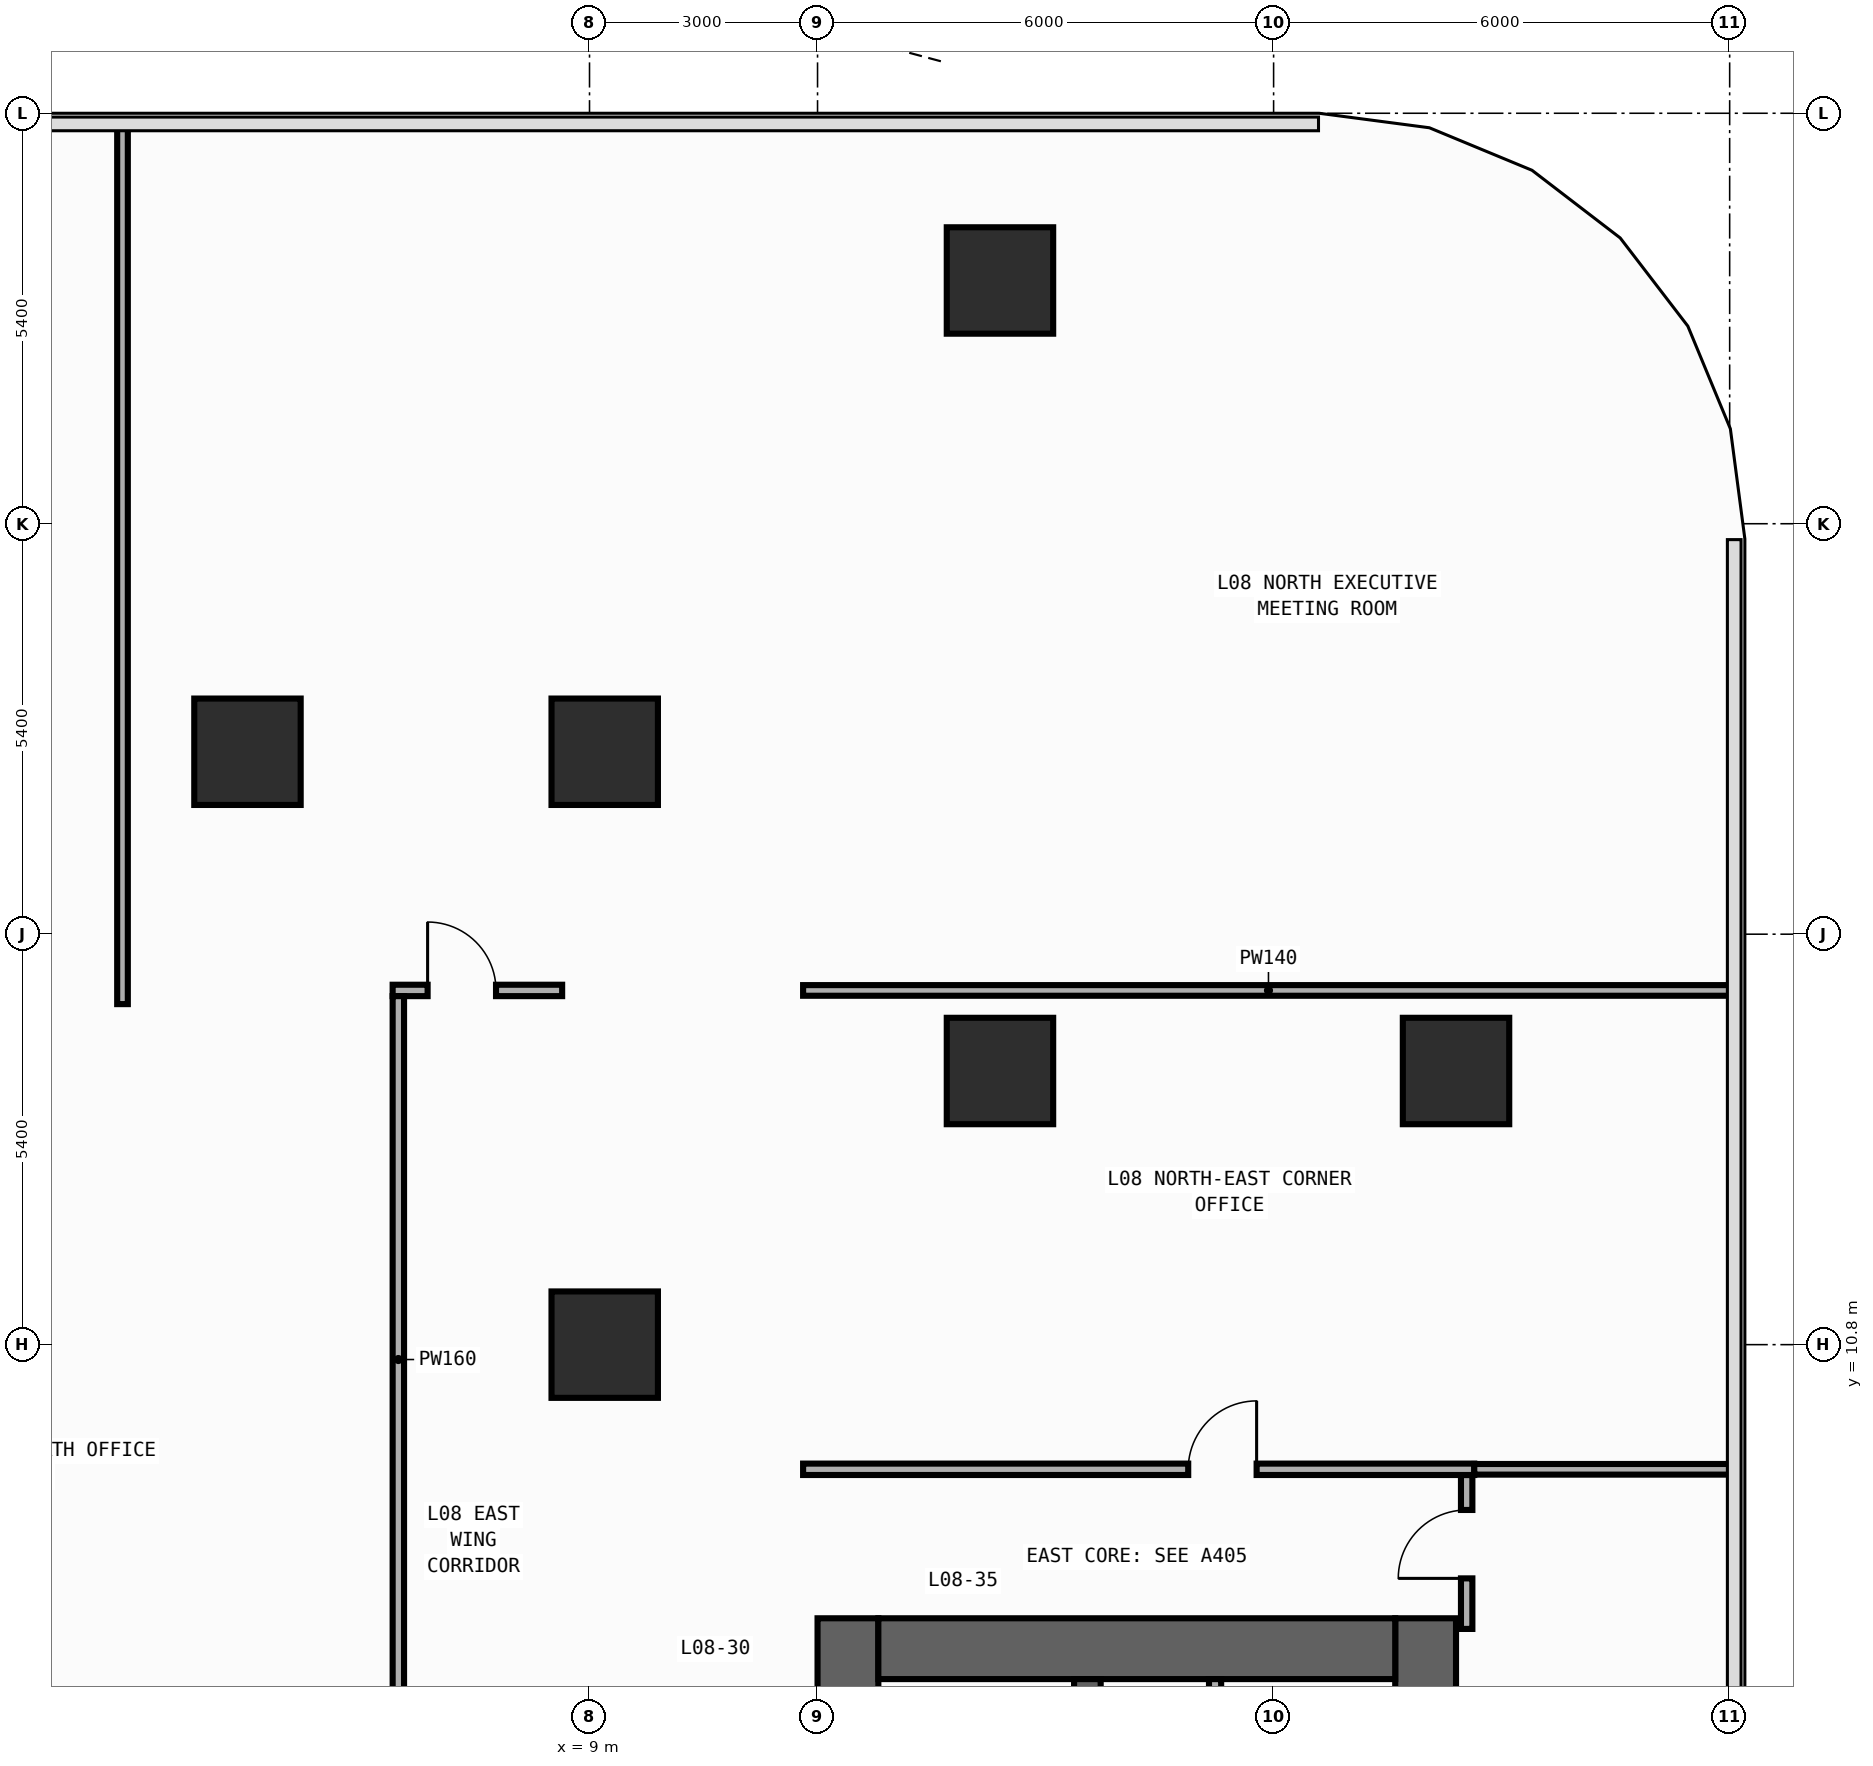
"""IFC4 building model, lengths in metres.
Left out: names, types, materials, properties, quantities, classifications, styles, units other than length and angle.
Written with IfcOpenShell. Run it as: python <this file> out.ifc"""

import sys

from ifc_helpers import new_model, si_unit, direction, frame, frame_2d, origin, origin_2d, place, context, subcontext, project, spatial, rectangle, extrude, element, fill, save


model = new_model("IFC4")
c1 = context("Model", 3, precision=1e-05, world=origin(), true_north=direction((0.0, 1.0)))
c2 = subcontext(c1, "Body", "Model", "MODEL_VIEW")
j1 = project(units=[si_unit("LENGTHUNIT", "METRE"), si_unit("PLANEANGLEUNIT", "RADIAN")], contexts=[c1])
p1 = place(None, origin())
s1 = spatial("IfcSite", under=j1, at=p1, CompositionType="ELEMENT")
p2 = place(p1, origin())
s2 = spatial("IfcBuilding", under=s1, at=p2, CompositionType="ELEMENT")
p3 = place(p2, frame((0.0, 0.0, 34.4)))
s3 = spatial("IfcBuildingStorey", under=s2, at=p3, CompositionType="ELEMENT", Elevation=34.4)
p4 = place(p3, frame((12.4, -19.8, 0.0), z_axis=(0.0, 0.0, 1.0), x_axis=(0.0, 1.0, 0.0)))
e1 = element("IfcWall", 1, at=p4, inside=s3, PredefinedType="SHEAR", context=c2, shape_type="SweptSolid", body=[
    extrude(rectangle(XDim=27.0, YDim=0.8, at=frame_2d((13.5, 0.0))), origin(), (0.0, 0.0, 1.0), 3.94),
])
p5 = place(p4, frame((23.05, 0.0, 0.0)))
e2 = element("IfcOpeningElement", 2, at=p5, cuts=e1, PredefinedType="OPENING", context=c2, shape_type="SweptSolid", body=[
    extrude(rectangle(XDim=1.1, YDim=2.2, at=frame_2d((0.55, 1.1))), frame((0.0, 0.41, 0.0), z_axis=(0.0, -1.0, 0.0), x_axis=(1.0, 0.0, 0.0)), (0.0, 0.0, 1.0), 0.82),
])
p6 = place(p4, frame((19.85, 0.0, 0.0)))
e3 = element("IfcOpeningElement", 3, at=p6, cuts=e1, PredefinedType="OPENING", context=c2, shape_type="SweptSolid", body=[
    extrude(rectangle(XDim=1.1, YDim=2.2, at=frame_2d((0.55, 1.1))), frame((0.0, 0.41, 0.0), z_axis=(0.0, -1.0, 0.0), x_axis=(1.0, 0.0, 0.0)), (0.0, 0.0, 1.0), 0.82),
])
p7 = place(p4, frame((16.65, 0.0, 0.0)))
e4 = element("IfcOpeningElement", 4, at=p7, cuts=e1, PredefinedType="OPENING", context=c2, shape_type="SweptSolid", body=[
    extrude(rectangle(XDim=1.1, YDim=2.2, at=frame_2d((0.55, 1.1))), frame((0.0, 0.41, 0.0), z_axis=(0.0, -1.0, 0.0), x_axis=(1.0, 0.0, 0.0)), (0.0, 0.0, 1.0), 0.82),
])
p8 = place(p4, frame((7.175, 0.0, 0.0)))
e5 = element("IfcOpeningElement", 5, at=p8, cuts=e1, PredefinedType="OPENING", context=c2, shape_type="SweptSolid", body=[
    extrude(rectangle(XDim=0.85, YDim=2.1, at=frame_2d((0.425, 1.05))), frame((0.0, 0.41, 0.0), z_axis=(0.0, -1.0, 0.0), x_axis=(1.0, 0.0, 0.0)), (0.0, 0.0, 1.0), 0.82),
])
p9 = place(p4, frame((10.375, 0.0, 0.0)))
e6 = element("IfcOpeningElement", 6, at=p9, cuts=e1, PredefinedType="OPENING", context=c2, shape_type="SweptSolid", body=[
    extrude(rectangle(XDim=0.85, YDim=2.1, at=frame_2d((0.425, 1.05))), frame((0.0, 0.41, 0.0), z_axis=(0.0, -1.0, 0.0), x_axis=(1.0, 0.0, 0.0)), (0.0, 0.0, 1.0), 0.82),
])
p10 = place(p4, frame((12.725, 0.0, 0.0)))
e7 = element("IfcOpeningElement", 7, at=p10, cuts=e1, PredefinedType="OPENING", context=c2, shape_type="SweptSolid", body=[
    extrude(rectangle(XDim=1.15, YDim=2.2, at=frame_2d((0.575, 1.1))), frame((0.0, 0.41, 0.0), z_axis=(0.0, -1.0, 0.0), x_axis=(1.0, 0.0, 0.0)), (0.0, 0.0, 1.0), 0.82),
])
p11 = place(p4, frame((25.125, 0.0, 0.0)))
e8 = element("IfcOpeningElement", 8, at=p11, cuts=e1, PredefinedType="OPENING", context=c2, shape_type="SweptSolid", body=[
    extrude(rectangle(XDim=0.85, YDim=2.1, at=frame_2d((0.425, 1.05))), frame((0.0, 0.41, 0.0), z_axis=(0.0, -1.0, 0.0), x_axis=(1.0, 0.0, 0.0)), (0.0, 0.0, 1.0), 0.82),
])
p12 = place(p3, frame((20.0, -19.8, 0.0), z_axis=(0.0, 0.0, 1.0), x_axis=(0.0, 1.0, 0.0)))
e9 = element("IfcWall", 9, at=p12, inside=s3, PredefinedType="SHEAR", context=c2, shape_type="SweptSolid", body=[
    extrude(rectangle(XDim=27.0, YDim=0.8, at=frame_2d((13.5, 0.0))), origin(), (0.0, 0.0, 1.0), 3.94),
])
p13 = place(p3, frame((12.8, 6.8, 0.0), z_axis=(0.0, 0.0, 1.0), x_axis=(1.0, 0.0, 0.0)))
e10 = element("IfcWall", 10, at=p13, inside=s3, PredefinedType="SHEAR", context=c2, shape_type="SweptSolid", body=[
    extrude(rectangle(XDim=6.8, YDim=0.8, at=frame_2d((3.4, 0.0))), origin(), (0.0, 0.0, 1.0), 3.94),
])
p14 = place(p3, frame((15.55, -19.0, 0.0), z_axis=(0.0, 0.0, 1.0), x_axis=(0.0, 1.0, 0.0)))
e11 = element("IfcWall", 11, at=p14, inside=s3, PredefinedType="SHEAR", context=c2, shape_type="SweptSolid", body=[
    extrude(rectangle(XDim=25.4, YDim=0.35, at=frame_2d((12.7, 0.0))), origin(), (0.0, 0.0, 1.0), 3.94),
])
p15 = place(p14, frame((11.925, 0.0, 0.0)))
e12 = element("IfcOpeningElement", 12, at=p15, cuts=e11, PredefinedType="OPENING", context=c2, shape_type="SweptSolid", body=[
    extrude(rectangle(XDim=1.15, YDim=2.2, at=frame_2d((0.575, 1.1))), frame((0.0, 0.185, 0.0), z_axis=(0.0, -1.0, 0.0), x_axis=(1.0, 0.0, 0.0)), (0.0, 0.0, 1.0), 0.37),
])
p16 = place(p14, frame((24.325, 0.0, 0.0)))
e13 = element("IfcOpeningElement", 13, at=p16, cuts=e11, PredefinedType="OPENING", context=c2, shape_type="SweptSolid", body=[
    extrude(rectangle(XDim=0.85, YDim=2.1, at=frame_2d((0.425, 1.05))), frame((0.0, 0.185, 0.0), z_axis=(0.0, -1.0, 0.0), x_axis=(1.0, 0.0, 0.0)), (0.0, 0.0, 1.0), 0.37),
])
for number, where, z_axis, x_axis in (
    (14, (9.2, 10.8, 0.0), (0.0, 0.0, 1.0), (1.0, 0.0, 0.0)),
    (15, (9.2, 18.6, 0.0), (0.0, 0.0, 1.0), (1.0, 0.0, 0.0)),
    (16, (20.4, 14.4, 0.0), (0.0, 0.0, 1.0), (1.0, 0.0, 0.0)),
    (17, (14.4, 14.4, 0.0), (0.0, 0.0, 1.0), (1.0, 0.0, 0.0)),
    (18, (4.5, 18.6, 0.0), (0.0, 0.0, 1.0), (1.0, 0.0, 0.0)),
    (19, (14.4, 24.8, 0.0), (0.0, 0.0, 1.0), (1.0, 0.0, 0.0)),
):
    element("IfcColumn", number, at=place(p3, frame(where, z_axis=z_axis, x_axis=x_axis)), inside=s3, PredefinedType="COLUMN", context=c2, shape_type="SweptSolid", body=[
        extrude(rectangle(XDim=1.4, YDim=1.4, at=origin_2d()), origin(), (0.0, 0.0, 1.0), 4.2),
    ])
p17 = place(p3, frame((17.23, 4.17, 0.0), z_axis=(0.0, 0.0, 1.0), x_axis=(0.0, 1.0, 0.0)))
e20 = element("IfcWall", 20, at=p17, inside=s3, PredefinedType="PARTITIONING", context=c2, shape_type="SweptSolid", body=[
    extrude(rectangle(XDim=2.23, YDim=0.16, at=frame_2d((1.115, 0.0))), origin(), (0.0, 0.0, 1.0), 3.94),
])
p18 = place(p17, frame((0.46, 0.0, 0.0)))
e21 = element("IfcOpeningElement", 21, at=p18, cuts=e20, PredefinedType="OPENING", context=c2, shape_type="SweptSolid", body=[
    extrude(rectangle(XDim=0.85, YDim=2.1, at=frame_2d((0.425, 1.05))), frame((0.0, 0.09, 0.0), z_axis=(0.0, -1.0, 0.0), x_axis=(1.0, 0.0, 0.0)), (0.0, 0.0, 1.0), 0.18),
])
p19 = place(p3, frame((6.41, 15.46, 0.0), z_axis=(0.0, 0.0, 1.0), x_axis=(1.0, 0.0, 0.0)))
e22 = element("IfcWall", 22, at=p19, inside=s3, PredefinedType="PARTITIONING", context=c2, shape_type="SweptSolid", body=[
    extrude(rectangle(XDim=2.23, YDim=0.15, at=frame_2d((1.115, 0.0))), origin(), (0.0, 0.0, 1.0), 3.94),
])
p20 = place(p19, frame((0.46, 0.0, 0.0)))
e23 = element("IfcOpeningElement", 23, at=p20, cuts=e22, PredefinedType="OPENING", context=c2, shape_type="SweptSolid", body=[
    extrude(rectangle(XDim=0.9, YDim=2.15, at=frame_2d((0.45, 1.075))), frame((0.0, 0.085, 0.0), z_axis=(0.0, -1.0, 0.0), x_axis=(1.0, 0.0, 0.0)), (0.0, 0.0, 1.0), 0.17),
])
p21 = place(p3, frame((6.485, -3.02, 0.0), z_axis=(0.0, 0.0, 1.0), x_axis=(0.0, 1.0, 0.0)))
e24 = element("IfcWall", 24, at=p21, inside=s3, PredefinedType="PARTITIONING", context=c2, shape_type="SweptSolid", body=[
    extrude(rectangle(XDim=18.405, YDim=0.15, at=frame_2d((9.203, 0.0))), origin(), (0.0, 0.0, 1.0), 3.94),
])
p22 = place(p21, frame((7.944, 0.0, 0.0)))
e25 = element("IfcOpeningElement", 25, at=p22, cuts=e24, PredefinedType="OPENING", context=c2, shape_type="SweptSolid", body=[
    extrude(rectangle(XDim=0.9, YDim=2.15, at=frame_2d((0.45, 1.075))), frame((0.0, 0.085, 0.0), z_axis=(0.0, -1.0, 0.0), x_axis=(1.0, 0.0, 0.0)), (0.0, 0.0, 1.0), 0.17),
])
p23 = place(p3, frame((20.54, 7.06, 0.0), z_axis=(0.0, 0.0, 1.0), x_axis=(0.0, 1.0, 0.0)))
e26 = element("IfcWall", 26, at=p23, inside=s3, PredefinedType="PARTITIONING", context=c2, shape_type="SweptSolid", body=[
    extrude(rectangle(XDim=2.025, YDim=0.15, at=frame_2d((1.012, 0.0))), origin(), (0.0, 0.0, 1.0), 3.94),
])
p24 = place(p23, frame((0.665, 0.0, 0.0)))
e27 = element("IfcOpeningElement", 27, at=p24, cuts=e26, PredefinedType="OPENING", context=c2, shape_type="SweptSolid", body=[
    extrude(rectangle(XDim=0.9, YDim=2.15, at=frame_2d((0.45, 1.075))), frame((0.0, 0.085, 0.0), z_axis=(0.0, -1.0, 0.0), x_axis=(1.0, 0.0, 0.0)), (0.0, 0.0, 1.0), 0.17),
])
p25 = place(p3, frame((11.81, 9.16, 0.0), z_axis=(0.0, 0.0, 1.0), x_axis=(1.0, 0.0, 0.0)))
e28 = element("IfcWall", 28, at=p25, inside=s3, PredefinedType="PARTITIONING", context=c2, shape_type="SweptSolid", body=[
    extrude(rectangle(XDim=8.83, YDim=0.15, at=frame_2d((4.415, 0.0))), origin(), (0.0, 0.0, 1.0), 3.94),
])
p26 = place(p25, frame((5.067, 0.0, 0.0)))
e29 = element("IfcOpeningElement", 29, at=p26, cuts=e28, PredefinedType="OPENING", context=c2, shape_type="SweptSolid", body=[
    extrude(rectangle(XDim=0.9, YDim=2.15, at=frame_2d((0.45, 1.075))), frame((0.0, 0.085, 0.0), z_axis=(0.0, -1.0, 0.0), x_axis=(1.0, 0.0, 0.0)), (0.0, 0.0, 1.0), 0.17),
])
p27 = place(p3, frame((20.64, 9.16, 0.0), z_axis=(0.0, 0.0, 1.0), x_axis=(1.0, 0.0, 0.0)))
e30 = element("IfcWall", 30, at=p27, inside=s3, PredefinedType="PARTITIONING", context=c2, shape_type="SweptSolid", body=[
    extrude(rectangle(XDim=3.415, YDim=0.14, at=frame_2d((1.708, 0.0))), origin(), (0.0, 0.0, 1.0), 3.94),
])
p28 = place(p3, frame((11.81, 15.46, 0.0), z_axis=(0.0, 0.0, 1.0), x_axis=(1.0, 0.0, 0.0)))
e31 = element("IfcWall", 31, at=p28, inside=s3, PredefinedType="PARTITIONING", context=c2, shape_type="SweptSolid", body=[
    extrude(rectangle(XDim=12.245, YDim=0.14, at=frame_2d((6.123, 0.0))), origin(), (0.0, 0.0, 1.0), 3.94),
])
p29 = place(p3, frame((2.856, 15.28, 0.0), z_axis=(0.0, 0.0, 1.0), x_axis=(0.0, 1.0, 0.0)))
e32 = element("IfcWall", 32, at=p29, inside=s3, PredefinedType="PARTITIONING", context=c2, shape_type="SweptSolid", body=[
    extrude(rectangle(XDim=11.575, YDim=0.14, at=frame_2d((5.788, 0.0))), origin(), (0.0, 0.0, 1.0), 3.94),
])
p30 = place(p20, origin())
e33 = element("IfcDoor", 33, at=p30, inside=s3, OperationType="SINGLE_SWING_LEFT", PredefinedType="DOOR", context=c2, shape_type="SweptSolid", body=[
    extrude(rectangle(XDim=0.9, YDim=2.15, at=frame_2d((0.45, 1.075))), frame((0.0, 0.025, 0.0), z_axis=(0.0, -1.0, 0.0), x_axis=(1.0, 0.0, 0.0)), (0.0, 0.0, 1.0), 0.05),
])
fill(e23, e33)
p31 = place(p24, origin())
e34 = element("IfcDoor", 34, at=p31, inside=s3, OperationType="SINGLE_SWING_LEFT", PredefinedType="DOOR", context=c2, shape_type="SweptSolid", body=[
    extrude(rectangle(XDim=0.9, YDim=2.15, at=frame_2d((0.45, 1.075))), frame((0.0, 0.025, 0.0), z_axis=(0.0, -1.0, 0.0), x_axis=(1.0, 0.0, 0.0)), (0.0, 0.0, 1.0), 0.05),
])
fill(e27, e34)
p32 = place(p26, origin())
e35 = element("IfcDoor", 35, at=p32, inside=s3, OperationType="SINGLE_SWING_RIGHT", PredefinedType="DOOR", context=c2, shape_type="SweptSolid", body=[
    extrude(rectangle(XDim=0.9, YDim=2.15, at=frame_2d((0.45, 1.075))), frame((0.0, 0.025, 0.0), z_axis=(0.0, -1.0, 0.0), x_axis=(1.0, 0.0, 0.0)), (0.0, 0.0, 1.0), 0.05),
])
fill(e29, e35)
save(model, sys.argv[1])
